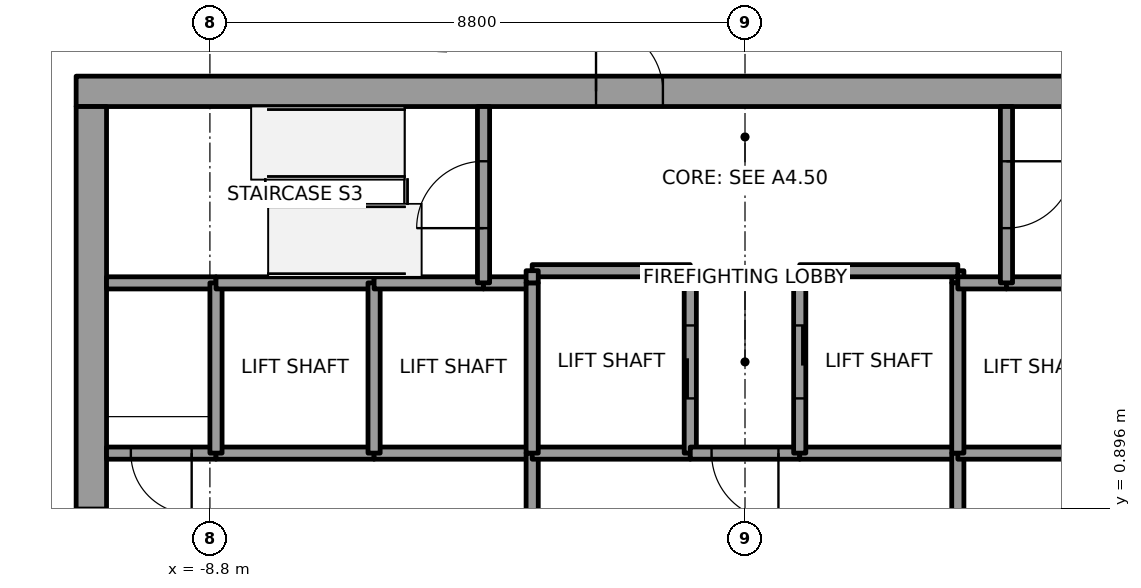
"""IFC4 building model, lengths in metres.
Left out: names, types, materials, properties, quantities, classifications, styles, units other than length and angle.
Written with IfcOpenShell. Run it as: python <this file> out.ifc"""

import sys

from ifc_helpers import new_model, si_unit, direction, frame, frame_2d, origin, place, context, subcontext, project, spatial, rectangle, extrude, element, fill, save


model = new_model("IFC4")
c1 = context("Model", 3, precision=1e-05, world=origin(), true_north=direction((0.0, 1.0)))
c2 = subcontext(c1, "Body", "Model", "MODEL_VIEW")
j1 = project(units=[si_unit("LENGTHUNIT", "METRE"), si_unit("PLANEANGLEUNIT", "RADIAN")], contexts=[c1])
p1 = place(None, origin())
s1 = spatial("IfcSite", under=j1, at=p1, CompositionType="ELEMENT")
p2 = place(p1, origin())
s2 = spatial("IfcBuilding", under=s1, at=p2, CompositionType="ELEMENT")
p3 = place(p2, frame((0.0, 0.0, 213.8)))
s3 = spatial("IfcBuildingStorey", under=s2, at=p3, CompositionType="ELEMENT", Elevation=213.8)
p4 = place(p3, frame((-11.0, 7.75, 0.0), z_axis=(0.0, 0.0, 1.0), x_axis=(1.0, 0.0, 0.0)))
e1 = element("IfcWall", 1, at=p4, inside=s3, PredefinedType="SHEAR", context=c2, shape_type="SweptSolid", body=[
    extrude(rectangle(XDim=22.0, YDim=0.5, at=frame_2d((11.0, 0.0))), origin(), (0.0, 0.0, 1.0), 6.0),
])
p5 = place(p4, frame((8.55, 0.0, 0.0)))
e2 = element("IfcOpeningElement", 2, at=p5, cuts=e1, PredefinedType="OPENING", context=c2, shape_type="SweptSolid", body=[
    extrude(rectangle(XDim=1.1, YDim=2.1, at=frame_2d((0.55, 1.05))), frame((0.0, 0.25, 0.0), z_axis=(0.0, -1.0, 0.0), x_axis=(1.0, 0.0, 0.0)), (0.0, 0.0, 1.0), 0.5),
])
p6 = place(p3, frame((-10.75, -7.5, 0.0), z_axis=(0.0, 0.0, 1.0), x_axis=(0.0, 1.0, 0.0)))
e3 = element("IfcWall", 3, at=p6, inside=s3, PredefinedType="SHEAR", context=c2, shape_type="SweptSolid", body=[
    extrude(rectangle(XDim=15.0, YDim=0.5, at=frame_2d((7.5, 0.0))), origin(), (0.0, 0.0, 1.0), 6.0),
])
p7 = place(p6, frame((6.6, 0.0, 0.0)))
e4 = element("IfcOpeningElement", 4, at=p7, cuts=e3, PredefinedType="OPENING", context=c2, shape_type="SweptSolid", body=[
    extrude(rectangle(XDim=1.8, YDim=2.1, at=frame_2d((0.9, 1.05))), frame((0.0, 0.25, 0.0), z_axis=(0.0, -1.0, 0.0), x_axis=(1.0, 0.0, 0.0)), (0.0, 0.0, 1.0), 0.5),
])
p8 = place(p3, frame((-8.7, 1.8, 0.0), z_axis=(0.0, 0.0, 1.0), x_axis=(-1.0, 0.0, 0.0)))
e5 = element("IfcWall", 5, at=p8, inside=s3, PredefinedType="SOLIDWALL", context=c2, shape_type="SweptSolid", body=[
    extrude(rectangle(XDim=1.8, YDim=0.2, at=frame_2d((0.9, 0.0))), origin(), (0.0, 0.0, 1.0), 5.85),
])
p9 = place(p8, frame((0.4, 0.0, 0.0)))
e6 = element("IfcOpeningElement", 6, at=p9, cuts=e5, PredefinedType="OPENING", context=c2, shape_type="SweptSolid", body=[
    extrude(rectangle(XDim=1.0, YDim=2.1, at=frame_2d((0.5, 1.05))), frame((0.0, 0.1, 0.0), z_axis=(0.0, -1.0, 0.0), x_axis=(1.0, 0.0, 0.0)), (0.0, 0.0, 1.0), 0.2),
])
p10 = place(p3, frame((-8.7, 4.6, 0.0), z_axis=(0.0, 0.0, 1.0), x_axis=(-1.0, 0.0, 0.0)))
e7 = element("IfcWall", 7, at=p10, inside=s3, PredefinedType="SOLIDWALL", context=c2, shape_type="SweptSolid", body=[
    extrude(rectangle(XDim=1.8, YDim=0.2, at=frame_2d((0.9, 0.0))), origin(), (0.0, 0.0, 1.0), 5.85),
])
p11 = place(p3, frame((-6.1, 1.8, 0.0), z_axis=(0.0, 0.0, 1.0), x_axis=(-1.0, 0.0, 0.0)))
e8 = element("IfcWall", 8, at=p11, inside=s3, PredefinedType="SOLIDWALL", context=c2, shape_type="SweptSolid", body=[
    extrude(rectangle(XDim=2.6, YDim=0.2, at=frame_2d((1.3, 0.0))), origin(), (0.0, 0.0, 1.0), 5.85),
])
p12 = place(p3, frame((-8.7, 1.8, 0.0), z_axis=(0.0, 0.0, 1.0), x_axis=(0.0, 1.0, 0.0)))
e9 = element("IfcWall", 9, at=p12, inside=s3, PredefinedType="SOLIDWALL", context=c2, shape_type="SweptSolid", body=[
    extrude(rectangle(XDim=2.8, YDim=0.2, at=frame_2d((1.4, 0.0))), origin(), (0.0, 0.0, 1.0), 5.85),
])
p13 = place(p3, frame((-6.1, 4.6, 0.0), z_axis=(0.0, 0.0, 1.0), x_axis=(-1.0, 0.0, 0.0)))
e10 = element("IfcWall", 10, at=p13, inside=s3, PredefinedType="SOLIDWALL", context=c2, shape_type="SweptSolid", body=[
    extrude(rectangle(XDim=2.6, YDim=0.2, at=frame_2d((1.3, 0.0))), origin(), (0.0, 0.0, 1.0), 5.85),
])
p14 = place(p3, frame((-3.5, 1.8, 0.0), z_axis=(0.0, 0.0, 1.0), x_axis=(-1.0, 0.0, 0.0)))
e11 = element("IfcWall", 11, at=p14, inside=s3, PredefinedType="SOLIDWALL", context=c2, shape_type="SweptSolid", body=[
    extrude(rectangle(XDim=2.6, YDim=0.2, at=frame_2d((1.3, 0.0))), origin(), (0.0, 0.0, 1.0), 5.85),
])
p15 = place(p3, frame((-6.1, 1.8, 0.0), z_axis=(0.0, 0.0, 1.0), x_axis=(0.0, 1.0, 0.0)))
e12 = element("IfcWall", 12, at=p15, inside=s3, PredefinedType="SOLIDWALL", context=c2, shape_type="SweptSolid", body=[
    extrude(rectangle(XDim=2.8, YDim=0.2, at=frame_2d((1.4, 0.0))), origin(), (0.0, 0.0, 1.0), 5.85),
])
p16 = place(p3, frame((-4.3, 4.6, 0.0), z_axis=(0.0, 0.0, 1.0), x_axis=(-1.0, 0.0, 0.0)))
e13 = element("IfcWall", 13, at=p16, inside=s3, PredefinedType="SOLIDWALL", context=c2, shape_type="SweptSolid", body=[
    extrude(rectangle(XDim=1.8, YDim=0.2, at=frame_2d((0.9, 0.0))), origin(), (0.0, 0.0, 1.0), 5.85),
])
p17 = place(p3, frame((-3.5, 4.6, 0.0), z_axis=(0.0, 0.0, 1.0), x_axis=(-1.0, 0.0, 0.0)))
e14 = element("IfcWall", 14, at=p17, inside=s3, PredefinedType="SOLIDWALL", context=c2, shape_type="SweptSolid", body=[
    extrude(rectangle(XDim=0.8, YDim=0.2, at=frame_2d((0.4, 0.0))), origin(), (0.0, 0.0, 1.0), 5.85),
])
p18 = place(p3, frame((-4.3, 4.6, 0.0), z_axis=(0.0, 0.0, 1.0), x_axis=(0.0, 1.0, 0.0)))
e15 = element("IfcWall", 15, at=p18, inside=s3, PredefinedType="SOLIDWALL", context=c2, shape_type="SweptSolid", body=[
    extrude(rectangle(XDim=2.9, YDim=0.2, at=frame_2d((1.45, 0.0))), origin(), (0.0, 0.0, 1.0), 5.85),
])
p19 = place(p18, frame((0.9, 0.0, 0.0)))
e16 = element("IfcOpeningElement", 16, at=p19, cuts=e15, PredefinedType="OPENING", context=c2, shape_type="SweptSolid", body=[
    extrude(rectangle(XDim=1.1, YDim=2.1, at=frame_2d((0.55, 1.05))), frame((0.0, 0.1, 0.0), z_axis=(0.0, -1.0, 0.0), x_axis=(1.0, 0.0, 0.0)), (0.0, 0.0, 1.0), 0.2),
])
p20 = place(p3, frame((-3.5, 1.8, 0.0), z_axis=(0.0, 0.0, 1.0), x_axis=(0.0, -1.0, 0.0)))
e17 = element("IfcWall", 17, at=p20, inside=s3, PredefinedType="SOLIDWALL", context=c2, shape_type="SweptSolid", body=[
    extrude(rectangle(XDim=3.6, YDim=0.2, at=frame_2d((1.8, 0.0))), origin(), (0.0, 0.0, 1.0), 5.85),
])
p21 = place(p20, frame((1.05, 0.0, 0.0)))
e18 = element("IfcOpeningElement", 18, at=p21, cuts=e17, PredefinedType="OPENING", context=c2, shape_type="SweptSolid", body=[
    extrude(rectangle(XDim=1.5, YDim=2.1, at=frame_2d((0.75, 1.05))), frame((0.0, 0.1, 0.0), z_axis=(0.0, -1.0, 0.0), x_axis=(1.0, 0.0, 0.0)), (0.0, 0.0, 1.0), 0.2),
])
p22 = place(p3, frame((-0.9, 1.8, 0.0), z_axis=(0.0, 0.0, 1.0), x_axis=(-1.0, 0.0, 0.0)))
e19 = element("IfcWall", 19, at=p22, inside=s3, PredefinedType="SOLIDWALL", context=c2, shape_type="SweptSolid", body=[
    extrude(rectangle(XDim=2.6, YDim=0.2, at=frame_2d((1.3, 0.0))), origin(), (0.0, 0.0, 1.0), 5.85),
])
p23 = place(p3, frame((-3.5, 4.6, 0.0), z_axis=(0.0, 0.0, 1.0), x_axis=(0.0, -1.0, 0.0)))
e20 = element("IfcWall", 20, at=p23, inside=s3, PredefinedType="SOLIDWALL", context=c2, shape_type="SweptSolid", body=[
    extrude(rectangle(XDim=2.8, YDim=0.2, at=frame_2d((1.4, 0.0))), origin(), (0.0, 0.0, 1.0), 5.85),
])
p24 = place(p3, frame((-0.9, 1.8, 0.0), z_axis=(0.0, 0.0, 1.0), x_axis=(0.0, 1.0, 0.0)))
e21 = element("IfcWall", 21, at=p24, inside=s3, PredefinedType="SOLIDWALL", context=c2, shape_type="SweptSolid", body=[
    extrude(rectangle(XDim=3.0, YDim=0.2, at=frame_2d((1.5, 0.0))), origin(), (0.0, 0.0, 1.0), 5.85),
])
p25 = place(p24, frame((0.9, 0.0, 0.0)))
e22 = element("IfcOpeningElement", 22, at=p25, cuts=e21, PredefinedType="OPENING", context=c2, shape_type="SweptSolid", body=[
    extrude(rectangle(XDim=1.2, YDim=2.1, at=frame_2d((0.6, 1.05))), frame((0.0, 0.1, 0.0), z_axis=(0.0, -1.0, 0.0), x_axis=(1.0, 0.0, 0.0)), (0.0, 0.0, 1.0), 0.2),
])
p26 = place(p3, frame((-0.9, 4.8, 0.0), z_axis=(0.0, 0.0, 1.0), x_axis=(-1.0, 0.0, 0.0)))
e23 = element("IfcWall", 23, at=p26, inside=s3, PredefinedType="SOLIDWALL", context=c2, shape_type="SweptSolid", body=[
    extrude(rectangle(XDim=2.6, YDim=0.2, at=frame_2d((1.3, 0.0))), origin(), (0.0, 0.0, 1.0), 5.85),
])
p27 = place(p3, frame((-3.5, 4.8, 0.0), z_axis=(0.0, 0.0, 1.0), x_axis=(0.0, -1.0, 0.0)))
e24 = element("IfcWall", 24, at=p27, inside=s3, PredefinedType="SOLIDWALL", context=c2, shape_type="SweptSolid", body=[
    extrude(rectangle(XDim=0.2, YDim=0.2, at=frame_2d((0.1, 0.0))), origin(), (0.0, 0.0, 1.0), 5.85),
])
p28 = place(p3, frame((0.9, 1.8, 0.0), z_axis=(0.0, 0.0, 1.0), x_axis=(-1.0, 0.0, 0.0)))
e25 = element("IfcWall", 25, at=p28, inside=s3, PredefinedType="SOLIDWALL", context=c2, shape_type="SweptSolid", body=[
    extrude(rectangle(XDim=1.8, YDim=0.2, at=frame_2d((0.9, 0.0))), origin(), (0.0, 0.0, 1.0), 5.85),
])
p29 = place(p28, frame((0.35, 0.0, 0.0)))
e26 = element("IfcOpeningElement", 26, at=p29, cuts=e25, PredefinedType="OPENING", context=c2, shape_type="SweptSolid", body=[
    extrude(rectangle(XDim=1.1, YDim=2.1, at=frame_2d((0.55, 1.05))), frame((0.0, 0.1, 0.0), z_axis=(0.0, -1.0, 0.0), x_axis=(1.0, 0.0, 0.0)), (0.0, 0.0, 1.0), 0.2),
])
p30 = place(p3, frame((3.5, 1.8, 0.0), z_axis=(0.0, 0.0, 1.0), x_axis=(-1.0, 0.0, 0.0)))
e27 = element("IfcWall", 27, at=p30, inside=s3, PredefinedType="SOLIDWALL", context=c2, shape_type="SweptSolid", body=[
    extrude(rectangle(XDim=2.6, YDim=0.2, at=frame_2d((1.3, 0.0))), origin(), (0.0, 0.0, 1.0), 5.85),
])
p31 = place(p3, frame((3.5, 4.6, 0.0), z_axis=(0.0, 0.0, 1.0), x_axis=(0.0, 1.0, 0.0)))
e28 = element("IfcWall", 28, at=p31, inside=s3, PredefinedType="SOLIDWALL", context=c2, shape_type="SweptSolid", body=[
    extrude(rectangle(XDim=0.2, YDim=0.2, at=frame_2d((0.1, 0.0))), origin(), (0.0, 0.0, 1.0), 5.85),
])
p32 = place(p3, frame((3.5, 4.8, 0.0), z_axis=(0.0, 0.0, 1.0), x_axis=(-1.0, 0.0, 0.0)))
e29 = element("IfcWall", 29, at=p32, inside=s3, PredefinedType="SOLIDWALL", context=c2, shape_type="SweptSolid", body=[
    extrude(rectangle(XDim=2.6, YDim=0.2, at=frame_2d((1.3, 0.0))), origin(), (0.0, 0.0, 1.0), 5.85),
])
p33 = place(p3, frame((0.9, 4.8, 0.0), z_axis=(0.0, 0.0, 1.0), x_axis=(0.0, -1.0, 0.0)))
e30 = element("IfcWall", 30, at=p33, inside=s3, PredefinedType="SOLIDWALL", context=c2, shape_type="SweptSolid", body=[
    extrude(rectangle(XDim=3.0, YDim=0.2, at=frame_2d((1.5, 0.0))), origin(), (0.0, 0.0, 1.0), 5.85),
])
p34 = place(p33, frame((0.9, 0.0, 0.0)))
e31 = element("IfcOpeningElement", 31, at=p34, cuts=e30, PredefinedType="OPENING", context=c2, shape_type="SweptSolid", body=[
    extrude(rectangle(XDim=1.2, YDim=2.1, at=frame_2d((0.6, 1.05))), frame((0.0, 0.1, 0.0), z_axis=(0.0, -1.0, 0.0), x_axis=(1.0, 0.0, 0.0)), (0.0, 0.0, 1.0), 0.2),
])
p35 = place(p3, frame((3.5, -1.8, 0.0), z_axis=(0.0, 0.0, 1.0), x_axis=(0.0, 1.0, 0.0)))
e32 = element("IfcWall", 32, at=p35, inside=s3, PredefinedType="SOLIDWALL", context=c2, shape_type="SweptSolid", body=[
    extrude(rectangle(XDim=3.6, YDim=0.2, at=frame_2d((1.8, 0.0))), origin(), (0.0, 0.0, 1.0), 5.85),
])
p36 = place(p35, frame((1.05, 0.0, 0.0)))
e33 = element("IfcOpeningElement", 33, at=p36, cuts=e32, PredefinedType="OPENING", context=c2, shape_type="SweptSolid", body=[
    extrude(rectangle(XDim=1.5, YDim=2.1, at=frame_2d((0.75, 1.05))), frame((0.0, 0.1, 0.0), z_axis=(0.0, -1.0, 0.0), x_axis=(1.0, 0.0, 0.0)), (0.0, 0.0, 1.0), 0.2),
])
p37 = place(p3, frame((6.1, 1.8, 0.0), z_axis=(0.0, 0.0, 1.0), x_axis=(-1.0, 0.0, 0.0)))
e34 = element("IfcWall", 34, at=p37, inside=s3, PredefinedType="SOLIDWALL", context=c2, shape_type="SweptSolid", body=[
    extrude(rectangle(XDim=2.6, YDim=0.2, at=frame_2d((1.3, 0.0))), origin(), (0.0, 0.0, 1.0), 5.85),
])
p38 = place(p3, frame((3.5, 1.8, 0.0), z_axis=(0.0, 0.0, 1.0), x_axis=(0.0, 1.0, 0.0)))
e35 = element("IfcWall", 35, at=p38, inside=s3, PredefinedType="SOLIDWALL", context=c2, shape_type="SweptSolid", body=[
    extrude(rectangle(XDim=2.8, YDim=0.2, at=frame_2d((1.4, 0.0))), origin(), (0.0, 0.0, 1.0), 5.85),
])
p39 = place(p3, frame((4.3, 4.6, 0.0), z_axis=(0.0, 0.0, 1.0), x_axis=(-1.0, 0.0, 0.0)))
e36 = element("IfcWall", 36, at=p39, inside=s3, PredefinedType="SOLIDWALL", context=c2, shape_type="SweptSolid", body=[
    extrude(rectangle(XDim=0.8, YDim=0.2, at=frame_2d((0.4, 0.0))), origin(), (0.0, 0.0, 1.0), 5.85),
])
p40 = place(p3, frame((6.1, 4.6, 0.0), z_axis=(0.0, 0.0, 1.0), x_axis=(-1.0, 0.0, 0.0)))
e37 = element("IfcWall", 37, at=p40, inside=s3, PredefinedType="SOLIDWALL", context=c2, shape_type="SweptSolid", body=[
    extrude(rectangle(XDim=1.8, YDim=0.2, at=frame_2d((0.9, 0.0))), origin(), (0.0, 0.0, 1.0), 5.85),
])
p41 = place(p3, frame((4.3, 7.5, 0.0), z_axis=(0.0, 0.0, 1.0), x_axis=(0.0, -1.0, 0.0)))
e38 = element("IfcWall", 38, at=p41, inside=s3, PredefinedType="SOLIDWALL", context=c2, shape_type="SweptSolid", body=[
    extrude(rectangle(XDim=2.9, YDim=0.2, at=frame_2d((1.45, 0.0))), origin(), (0.0, 0.0, 1.0), 5.85),
])
p42 = place(p41, frame((0.9, 0.0, 0.0)))
e39 = element("IfcOpeningElement", 39, at=p42, cuts=e38, PredefinedType="OPENING", context=c2, shape_type="SweptSolid", body=[
    extrude(rectangle(XDim=1.1, YDim=2.1, at=frame_2d((0.55, 1.05))), frame((0.0, 0.1, 0.0), z_axis=(0.0, -1.0, 0.0), x_axis=(1.0, 0.0, 0.0)), (0.0, 0.0, 1.0), 0.2),
])
p43 = place(p25, origin())
e40 = element("IfcDoor", 40, at=p43, inside=s3, OperationType="SLIDING_TO_RIGHT", PredefinedType="DOOR", context=c2, shape_type="SweptSolid", body=[
    extrude(rectangle(XDim=1.2, YDim=2.1, at=frame_2d((0.6, 1.05))), frame((0.0, 0.025, 0.0), z_axis=(0.0, -1.0, 0.0), x_axis=(1.0, 0.0, 0.0)), (0.0, 0.0, 1.0), 0.05),
])
fill(e22, e40)
p44 = place(p34, origin())
e41 = element("IfcDoor", 41, at=p44, inside=s3, OperationType="SLIDING_TO_RIGHT", PredefinedType="DOOR", context=c2, shape_type="SweptSolid", body=[
    extrude(rectangle(XDim=1.2, YDim=2.1, at=frame_2d((0.6, 1.05))), frame((0.0, 0.025, 0.0), z_axis=(0.0, -1.0, 0.0), x_axis=(1.0, 0.0, 0.0)), (0.0, 0.0, 1.0), 0.05),
])
fill(e31, e41)
p45 = place(p29, origin())
e42 = element("IfcDoor", 42, at=p45, inside=s3, OperationType="SINGLE_SWING_LEFT", PredefinedType="DOOR", context=c2, shape_type="SweptSolid", body=[
    extrude(rectangle(XDim=1.1, YDim=2.1, at=frame_2d((0.55, 1.05))), frame((0.0, 0.025, 0.0), z_axis=(0.0, -1.0, 0.0), x_axis=(1.0, 0.0, 0.0)), (0.0, 0.0, 1.0), 0.05),
])
fill(e26, e42)
p46 = place(p9, origin())
e43 = element("IfcDoor", 43, at=p46, inside=s3, OperationType="SINGLE_SWING_RIGHT", PredefinedType="DOOR", context=c2, shape_type="SweptSolid", body=[
    extrude(rectangle(XDim=1.0, YDim=2.1, at=frame_2d((0.5, 1.05))), frame((0.0, 0.025, 0.0), z_axis=(0.0, -1.0, 0.0), x_axis=(1.0, 0.0, 0.0)), (0.0, 0.0, 1.0), 0.05),
])
fill(e6, e43)
p47 = place(p19, origin())
e44 = element("IfcDoor", 44, at=p47, inside=s3, OperationType="SINGLE_SWING_LEFT", PredefinedType="DOOR", context=c2, shape_type="SweptSolid", body=[
    extrude(rectangle(XDim=1.1, YDim=2.1, at=frame_2d((0.55, 1.05))), frame((0.0, 0.025, 0.0), z_axis=(0.0, -1.0, 0.0), x_axis=(1.0, 0.0, 0.0)), (0.0, 0.0, 1.0), 0.05),
])
fill(e16, e44)
p48 = place(p42, origin())
e45 = element("IfcDoor", 45, at=p48, inside=s3, OperationType="SINGLE_SWING_LEFT", PredefinedType="DOOR", context=c2, shape_type="SweptSolid", body=[
    extrude(rectangle(XDim=1.1, YDim=2.1, at=frame_2d((0.55, 1.05))), frame((0.0, 0.025, 0.0), z_axis=(0.0, -1.0, 0.0), x_axis=(1.0, 0.0, 0.0)), (0.0, 0.0, 1.0), 0.05),
])
fill(e39, e45)
p49 = place(p7, origin())
e46 = element("IfcDoor", 46, at=p49, inside=s3, OperationType="DOUBLE_DOOR_SINGLE_SWING", PredefinedType="DOOR", context=c2, shape_type="SweptSolid", body=[
    extrude(rectangle(XDim=1.8, YDim=2.1, at=frame_2d((0.9, 1.05))), frame((0.0, 0.025, 0.0), z_axis=(0.0, -1.0, 0.0), x_axis=(1.0, 0.0, 0.0)), (0.0, 0.0, 1.0), 0.05),
])
fill(e4, e46)
p50 = place(p5, origin())
e47 = element("IfcDoor", 47, at=p50, inside=s3, OperationType="SINGLE_SWING_RIGHT", PredefinedType="DOOR", context=c2, shape_type="SweptSolid", body=[
    extrude(rectangle(XDim=1.1, YDim=2.1, at=frame_2d((0.55, 1.05))), frame((0.0, 0.025, 0.0), z_axis=(0.0, -1.0, 0.0), x_axis=(1.0, 0.0, 0.0)), (0.0, 0.0, 1.0), 0.05),
])
fill(e2, e47)
save(model, sys.argv[1])
